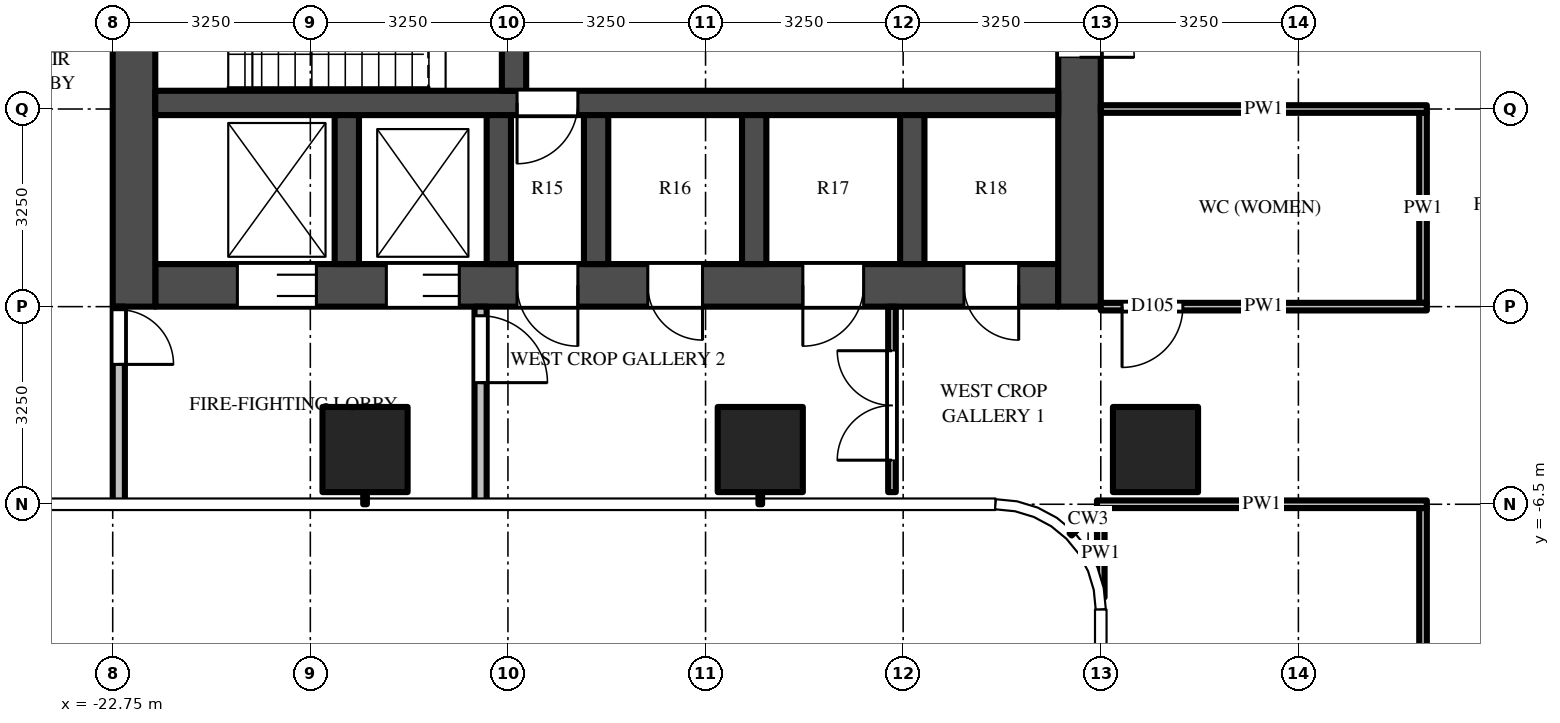
"""IFC4 building model, lengths in metres.
Left out: names, types, materials, properties, quantities, classifications, styles, units other than length and angle.
Written with IfcOpenShell. Run it as: python <this file> out.ifc"""

import sys

from ifc_helpers import new_model, si_unit, direction, frame, frame_2d, origin, origin_2d, place, context, subcontext, project, spatial, rectangle, extrude, source, transform, mapped, element, fill, save


model = new_model("IFC4")
c1 = context("Model", 3, precision=1e-05, world=origin(), true_north=direction((0.0, 1.0)))
c2 = subcontext(c1, "Body", "Model", "MODEL_VIEW")
j1 = project(units=[si_unit("LENGTHUNIT", "METRE"), si_unit("PLANEANGLEUNIT", "RADIAN")], contexts=[c1])
p1 = place(None, origin())
s1 = spatial("IfcSite", under=j1, at=p1, CompositionType="ELEMENT")
p2 = place(p1, origin())
s2 = spatial("IfcBuilding", under=s1, at=p2, CompositionType="ELEMENT")
p3 = place(p2, frame((0.0, 0.0, 70.0)))
s3 = spatial("IfcBuildingStorey", under=s2, at=p3, CompositionType="ELEMENT", Elevation=70.0)
m1 = source(origin(), c2, "Body", "SweptSolid", [
    extrude(rectangle(XDim=1.4, YDim=1.4, at=origin_2d()), origin(), (0.0, 0.0, 1.0), 4.5),
])
for number, where, z_axis, x_axis in (
    (1, (-5.6, -5.6, 0.0), (0.0, 0.0, 1.0), (1.0, 0.0, 0.0)),
    (2, (-12.1, -5.6, 0.0), (0.0, 0.0, 1.0), (1.0, 0.0, 0.0)),
    (3, (-18.6, -5.6, 0.0), (0.0, 0.0, 1.0), (1.0, 0.0, 0.0)),
):
    element("IfcColumn", number, at=place(p3, frame(where, z_axis=z_axis, x_axis=x_axis)), inside=s3, PredefinedType="COLUMN", context=c2, shape_type="MappedRepresentation", body=[
        mapped(m1, transform((0.0, 0.0, 0.0))),
    ])
m2 = source(origin(), c2, "Body", "SweptSolid", [
    extrude(rectangle(XDim=14.85, YDim=0.7, at=frame_2d((7.425, 0.0))), origin(), (0.0, 0.0, 1.0), 4.25),
])
p4 = place(p3, frame((-7.2, -2.9, 0.0), z_axis=(0.0, 0.0, 1.0), x_axis=(-1.0, 0.0, 0.0)))
e4 = element("IfcWall", 4, at=p4, inside=s3, PredefinedType="SHEAR", context=c2, shape_type="MappedRepresentation", body=[
    mapped(m2, transform((0.0, 0.0, 0.0))),
])
m3 = source(origin(), c2, "Body", "SweptSolid", [
    extrude(rectangle(XDim=1.3, YDim=2.1, at=frame_2d((0.65, 1.05))), frame((0.0, 0.36, 0.0), z_axis=(0.0, -1.0, 0.0), x_axis=(1.0, 0.0, 0.0)), (0.0, 0.0, 1.0), 0.72),
])
p5 = place(p4, frame((12.2, 0.0, 0.0)))
e5 = element("IfcOpeningElement", 5, at=p5, cuts=e4, PredefinedType="OPENING", context=c2, shape_type="MappedRepresentation", body=[
    mapped(m3, transform((0.0, 0.0, 0.0))),
])
m4 = source(origin(), c2, "Body", "SweptSolid", [
    extrude(rectangle(XDim=1.2, YDim=2.1, at=frame_2d((0.6, 1.05))), frame((0.0, 0.36, 0.0), z_axis=(0.0, -1.0, 0.0), x_axis=(1.0, 0.0, 0.0)), (0.0, 0.0, 1.0), 0.72),
])
p6 = place(p4, frame((9.85, 0.0, 0.0)))
e6 = element("IfcOpeningElement", 6, at=p6, cuts=e4, PredefinedType="OPENING", context=c2, shape_type="MappedRepresentation", body=[
    mapped(m4, transform((0.0, 0.0, 0.0))),
])
m5 = source(origin(), c2, "Body", "SweptSolid", [
    extrude(rectangle(XDim=1.0, YDim=2.1, at=frame_2d((0.5, 1.05))), frame((0.0, 0.36, 0.0), z_axis=(0.0, -1.0, 0.0), x_axis=(1.0, 0.0, 0.0)), (0.0, 0.0, 1.0), 0.72),
])
p7 = place(p4, frame((7.9, 0.0, 0.0)))
e7 = element("IfcOpeningElement", 7, at=p7, cuts=e4, PredefinedType="OPENING", context=c2, shape_type="MappedRepresentation", body=[
    mapped(m5, transform((0.0, 0.0, 0.0))),
])
m6 = source(origin(), c2, "Body", "SweptSolid", [
    extrude(rectangle(XDim=0.9, YDim=2.1, at=frame_2d((0.45, 1.05))), frame((0.0, 0.36, 0.0), z_axis=(0.0, -1.0, 0.0), x_axis=(1.0, 0.0, 0.0)), (0.0, 0.0, 1.0), 0.72),
])
p8 = place(p4, frame((0.65, 0.0, 0.0)))
e8 = element("IfcOpeningElement", 8, at=p8, cuts=e4, PredefinedType="OPENING", context=c2, shape_type="MappedRepresentation", body=[
    mapped(m6, transform((0.0, 0.0, 0.0))),
])
p9 = place(p4, frame((3.2, 0.0, 0.0)))
e9 = element("IfcOpeningElement", 9, at=p9, cuts=e4, PredefinedType="OPENING", context=c2, shape_type="MappedRepresentation", body=[
    mapped(m5, transform((0.0, 0.0, 0.0))),
])
p10 = place(p4, frame((5.85, 0.0, 0.0)))
e10 = element("IfcOpeningElement", 10, at=p10, cuts=e4, PredefinedType="OPENING", context=c2, shape_type="MappedRepresentation", body=[
    mapped(m6, transform((0.0, 0.0, 0.0))),
])
m7 = source(origin(), c2, "Body", "SweptSolid", [
    extrude(rectangle(XDim=9.05, YDim=0.7, at=frame_2d((4.525, 0.0))), origin(), (0.0, 0.0, 1.0), 4.25),
])
p11 = place(p3, frame((-6.85, 5.8, 0.0), z_axis=(0.0, 0.0, 1.0), x_axis=(0.0, -1.0, 0.0)))
e11 = element("IfcWall", 11, at=p11, inside=s3, PredefinedType="SHEAR", context=c2, shape_type="MappedRepresentation", body=[
    mapped(m7, transform((0.0, 0.0, 0.0))),
])
m8 = source(origin(), c2, "Body", "SweptSolid", [
    extrude(rectangle(XDim=1.8, YDim=2.1, at=frame_2d((0.9, 1.05))), frame((0.0, 0.36, 0.0), z_axis=(0.0, -1.0, 0.0), x_axis=(1.0, 0.0, 0.0)), (0.0, 0.0, 1.0), 0.72),
])
p12 = place(p11, frame((3.15, 0.0, 0.0)))
e12 = element("IfcOpeningElement", 12, at=p12, cuts=e11, PredefinedType="OPENING", context=c2, shape_type="MappedRepresentation", body=[
    mapped(m8, transform((0.0, 0.0, 0.0))),
])
p13 = place(p3, frame((-22.4, 5.8, 0.0), z_axis=(0.0, 0.0, 1.0), x_axis=(0.0, -1.0, 0.0)))
e13 = element("IfcWall", 13, at=p13, inside=s3, PredefinedType="SHEAR", context=c2, shape_type="MappedRepresentation", body=[
    mapped(m7, transform((0.0, 0.0, 0.0))),
])
m9 = source(origin(), c2, "Body", "SweptSolid", [
    extrude(rectangle(XDim=14.85, YDim=0.4, at=frame_2d((7.425, 0.0))), origin(), (0.0, 0.0, 1.0), 4.25),
])
p14 = place(p3, frame((-7.2, 0.1, 0.0), z_axis=(0.0, 0.0, 1.0), x_axis=(-1.0, 0.0, 0.0)))
e14 = element("IfcWall", 14, at=p14, inside=s3, PredefinedType="SHEAR", context=c2, shape_type="MappedRepresentation", body=[
    mapped(m9, transform((0.0, 0.0, 0.0))),
])
m10 = source(origin(), c2, "Body", "SweptSolid", [
    extrude(rectangle(XDim=1.0, YDim=2.1, at=frame_2d((0.5, 1.05))), frame((0.0, 0.21, 0.0), z_axis=(0.0, -1.0, 0.0), x_axis=(1.0, 0.0, 0.0)), (0.0, 0.0, 1.0), 0.42),
])
p15 = place(p14, frame((7.9, 0.0, 0.0)))
e15 = element("IfcOpeningElement", 15, at=p15, cuts=e14, PredefinedType="OPENING", context=c2, shape_type="MappedRepresentation", body=[
    mapped(m10, transform((0.0, 0.0, 0.0))),
])
m11 = source(origin(), c2, "Body", "SweptSolid", [
    extrude(rectangle(XDim=5.5, YDim=0.4, at=frame_2d((2.75, 0.0))), origin(), (0.0, 0.0, 1.0), 4.25),
])
p16 = place(p3, frame((-16.15, 5.8, 0.0), z_axis=(0.0, 0.0, 1.0), x_axis=(0.0, -1.0, 0.0)))
e16 = element("IfcWall", 16, at=p16, inside=s3, PredefinedType="SHEAR", context=c2, shape_type="MappedRepresentation", body=[
    mapped(m11, transform((0.0, 0.0, 0.0))),
])
m12 = source(origin(), c2, "Body", "SweptSolid", [
    extrude(rectangle(XDim=1.1, YDim=2.1, at=frame_2d((0.55, 1.05))), frame((0.0, 0.21, 0.0), z_axis=(0.0, -1.0, 0.0), x_axis=(1.0, 0.0, 0.0)), (0.0, 0.0, 1.0), 0.42),
])
p17 = place(p16, frame((0.725, 0.0, 0.0)))
e17 = element("IfcOpeningElement", 17, at=p17, cuts=e16, PredefinedType="OPENING", context=c2, shape_type="MappedRepresentation", body=[
    mapped(m12, transform((0.0, 0.0, 0.0))),
])
p18 = place(p16, frame((3.675, 0.0, 0.0)))
e18 = element("IfcOpeningElement", 18, at=p18, cuts=e16, PredefinedType="OPENING", context=c2, shape_type="MappedRepresentation", body=[
    mapped(m12, transform((0.0, 0.0, 0.0))),
])
m13 = source(origin(), c2, "Body", "SweptSolid", [
    extrude(rectangle(XDim=2.45, YDim=0.4, at=frame_2d((1.225, 0.0))), origin(), (0.0, 0.0, 1.0), 4.25),
])
for number, where, z_axis, x_axis in (
    (19, (-9.6, -0.1, 0.0), (0.0, 0.0, 1.0), (0.0, -1.0, 0.0)),
    (20, (-12.2, -0.1, 0.0), (0.0, 0.0, 1.0), (0.0, -1.0, 0.0)),
    (21, (-14.8, -0.1, 0.0), (0.0, 0.0, 1.0), (0.0, -1.0, 0.0)),
    (22, (-16.4, -0.1, 0.0), (0.0, 0.0, 1.0), (0.0, -1.0, 0.0)),
    (23, (-18.9, -0.1, 0.0), (0.0, 0.0, 1.0), (0.0, -1.0, 0.0)),
):
    element("IfcWall", number, at=place(p3, frame(where, z_axis=z_axis, x_axis=x_axis)), inside=s3, PredefinedType="SHEAR", context=c2, shape_type="MappedRepresentation", body=[
        mapped(m13, transform((0.0, 0.0, 0.0))),
    ])
m14 = source(origin(), c2, "Body", "SweptSolid", [
    extrude(rectangle(XDim=3.25, YDim=0.2, at=frame_2d((1.625, 0.0))), origin(), (0.0, 0.0, 1.0), 4.25),
])
p19 = place(p3, frame((-16.7, -3.25, 0.0), z_axis=(0.0, 0.0, 1.0), x_axis=(0.0, -1.0, 0.0)))
e24 = element("IfcWall", 24, at=p19, inside=s3, PredefinedType="PARTITIONING", context=c2, shape_type="MappedRepresentation", body=[
    mapped(m14, transform((0.0, 0.0, 0.0))),
])
m15 = source(origin(), c2, "Body", "SweptSolid", [
    extrude(rectangle(XDim=1.1, YDim=2.1, at=frame_2d((0.55, 1.05))), frame((0.0, 0.11, 0.0), z_axis=(0.0, -1.0, 0.0), x_axis=(1.0, 0.0, 0.0)), (0.0, 0.0, 1.0), 0.22),
])
p20 = place(p19, frame((0.15, 0.0, 0.0)))
e25 = element("IfcOpeningElement", 25, at=p20, cuts=e24, PredefinedType="OPENING", context=c2, shape_type="MappedRepresentation", body=[
    mapped(m15, transform((0.0, 0.0, 0.0))),
])
p21 = place(p3, frame((-22.65, -3.25, 0.0), z_axis=(0.0, 0.0, 1.0), x_axis=(0.0, -1.0, 0.0)))
e26 = element("IfcWall", 26, at=p21, inside=s3, PredefinedType="PARTITIONING", context=c2, shape_type="MappedRepresentation", body=[
    mapped(m14, transform((0.0, 0.0, 0.0))),
])
m16 = source(origin(), c2, "Body", "SweptSolid", [
    extrude(rectangle(XDim=0.9, YDim=2.1, at=frame_2d((0.45, 1.05))), frame((0.0, 0.11, 0.0), z_axis=(0.0, -1.0, 0.0), x_axis=(1.0, 0.0, 0.0)), (0.0, 0.0, 1.0), 0.22),
])
p22 = place(p21, frame((0.05, 0.0, 0.0)))
e27 = element("IfcOpeningElement", 27, at=p22, cuts=e26, PredefinedType="OPENING", context=c2, shape_type="MappedRepresentation", body=[
    mapped(m16, transform((0.0, 0.0, 0.0))),
])
m17 = source(origin(), c2, "Body", "SweptSolid", [
    extrude(rectangle(XDim=3.05, YDim=0.125, at=frame_2d((1.525, 0.0))), origin(), (0.0, 0.0, 1.0), 3.33),
])
p23 = place(p3, frame((-9.934, -6.3, 0.0), z_axis=(0.0, 0.0, 1.0), x_axis=(0.0, 1.0, 0.0)))
e28 = element("IfcWall", 28, at=p23, inside=s3, PredefinedType="PARTITIONING", context=c2, shape_type="MappedRepresentation", body=[
    mapped(m17, transform((0.0, 0.0, 0.0))),
])
m18 = source(origin(), c2, "Body", "SweptSolid", [
    extrude(rectangle(XDim=1.8, YDim=2.1, at=frame_2d((0.9, 1.05))), frame((0.0, 0.073, 0.0), z_axis=(0.0, -1.0, 0.0), x_axis=(1.0, 0.0, 0.0)), (0.0, 0.0, 1.0), 0.145),
])
p24 = place(p23, frame((0.525, 0.0, 0.0)))
e29 = element("IfcOpeningElement", 29, at=p24, cuts=e28, PredefinedType="OPENING", context=c2, shape_type="MappedRepresentation", body=[
    mapped(m18, transform((0.0, 0.0, 0.0))),
])
m19 = source(origin(), c2, "Body", "SweptSolid", [
    extrude(rectangle(XDim=1.469, YDim=0.125, at=frame_2d((0.734, 0.0))), origin(), (0.0, 0.0, 1.0), 4.25),
])
p25 = place(p3, frame((-6.5, -6.562, 0.0), z_axis=(0.0, 0.0, 1.0), x_axis=(0.0, -1.0, 0.0)))
e30 = element("IfcWall", 30, at=p25, inside=s3, PredefinedType="PARTITIONING", context=c2, shape_type="MappedRepresentation", body=[
    mapped(m19, transform((0.0, 0.0, 0.0))),
])
m20 = source(origin(), c2, "Body", "SweptSolid", [
    extrude(rectangle(XDim=5.475, YDim=0.125, at=frame_2d((2.738, 0.0))), origin(), (0.0, 0.0, 1.0), 3.468),
])
p26 = place(p3, frame((-1.2, -6.562, 0.0), z_axis=(0.0, 0.0, 1.0), x_axis=(0.0, -1.0, 0.0)))
e31 = element("IfcWall", 31, at=p26, inside=s3, PredefinedType="PARTITIONING", context=c2, shape_type="MappedRepresentation", body=[
    mapped(m20, transform((0.0, 0.0, 0.0))),
])
m21 = source(origin(), c2, "Body", "SweptSolid", [
    extrude(rectangle(XDim=1.2, YDim=2.1, at=frame_2d((0.6, 1.05))), frame((0.0, 0.073, 0.0), z_axis=(0.0, -1.0, 0.0), x_axis=(1.0, 0.0, 0.0)), (0.0, 0.0, 1.0), 0.145),
])
p27 = place(p26, frame((3.988, 0.0, 0.0)))
e32 = element("IfcOpeningElement", 32, at=p27, cuts=e31, PredefinedType="OPENING", context=c2, shape_type="MappedRepresentation", body=[
    mapped(m21, transform((0.0, 0.0, 0.0))),
])
m22 = source(origin(), c2, "Body", "SweptSolid", [
    extrude(rectangle(XDim=3.125, YDim=0.125, at=frame_2d((1.562, 0.0))), origin(), (0.0, 0.0, 1.0), 3.546),
])
p28 = place(p3, frame((-1.2, -0.062, 0.0), z_axis=(0.0, 0.0, 1.0), x_axis=(0.0, -1.0, 0.0)))
e33 = element("IfcWall", 33, at=p28, inside=s3, PredefinedType="PARTITIONING", context=c2, shape_type="MappedRepresentation", body=[
    mapped(m22, transform((0.0, 0.0, 0.0))),
])
m23 = source(origin(), c2, "Body", "SweptSolid", [
    extrude(rectangle(XDim=5.425, YDim=0.125, at=frame_2d((2.712, 0.0))), origin(), (0.0, 0.0, 1.0), 3.33),
])
p29 = place(p3, frame((-1.137, -6.5, 0.0), z_axis=(0.0, 0.0, 1.0), x_axis=(-1.0, 0.0, 0.0)))
e34 = element("IfcWall", 34, at=p29, inside=s3, PredefinedType="PARTITIONING", context=c2, shape_type="MappedRepresentation", body=[
    mapped(m23, transform((0.0, 0.0, 0.0))),
])
m24 = source(origin(), c2, "Body", "SweptSolid", [
    extrude(rectangle(XDim=5.363, YDim=0.125, at=frame_2d((2.681, 0.0))), origin(), (0.0, 0.0, 1.0), 3.468),
])
p30 = place(p3, frame((-1.137, -3.25, 0.0), z_axis=(0.0, 0.0, 1.0), x_axis=(-1.0, 0.0, 0.0)))
e35 = element("IfcWall", 35, at=p30, inside=s3, PredefinedType="PARTITIONING", context=c2, shape_type="MappedRepresentation", body=[
    mapped(m24, transform((0.0, 0.0, 0.0))),
])
m25 = source(origin(), c2, "Body", "SweptSolid", [
    extrude(rectangle(XDim=1.0, YDim=2.1, at=frame_2d((0.5, 1.05))), frame((0.0, 0.073, 0.0), z_axis=(0.0, -1.0, 0.0), x_axis=(1.0, 0.0, 0.0)), (0.0, 0.0, 1.0), 0.145),
])
p31 = place(p30, frame((4.012, 0.0, 0.0)))
e36 = element("IfcOpeningElement", 36, at=p31, cuts=e35, PredefinedType="OPENING", context=c2, shape_type="MappedRepresentation", body=[
    mapped(m25, transform((0.0, 0.0, 0.0))),
])
p32 = place(p3, frame((-1.137, 0.0, 0.0), z_axis=(0.0, 0.0, 1.0), x_axis=(-1.0, 0.0, 0.0)))
e37 = element("IfcWall", 37, at=p32, inside=s3, PredefinedType="PARTITIONING", context=c2, shape_type="MappedRepresentation", body=[
    mapped(m24, transform((0.0, 0.0, 0.0))),
])
m26 = source(origin(), c2, "Body", "SweptSolid", [
    extrude(rectangle(XDim=1.3, YDim=2.1, at=frame_2d((0.65, 1.05))), frame((0.0, -0.275, 0.0), z_axis=(0.0, -1.0, 0.0), x_axis=(1.0, 0.0, 0.0)), (0.0, 0.0, 1.0), 0.05),
])
p33 = place(p5, origin())
e38 = element("IfcDoor", 38, at=p33, inside=s3, OperationType="DOUBLE_DOOR_SLIDING", PredefinedType="DOOR", context=c2, shape_type="MappedRepresentation", body=[
    mapped(m26, transform((0.0, 0.0, 0.0))),
])
fill(e5, e38)
m27 = source(origin(), c2, "Body", "SweptSolid", [
    extrude(rectangle(XDim=1.2, YDim=2.1, at=frame_2d((0.6, 1.05))), frame((0.0, -0.275, 0.0), z_axis=(0.0, -1.0, 0.0), x_axis=(1.0, 0.0, 0.0)), (0.0, 0.0, 1.0), 0.05),
])
p34 = place(p6, origin())
e39 = element("IfcDoor", 39, at=p34, inside=s3, OperationType="DOUBLE_DOOR_SLIDING", PredefinedType="DOOR", context=c2, shape_type="MappedRepresentation", body=[
    mapped(m27, transform((0.0, 0.0, 0.0))),
])
fill(e6, e39)
m28 = source(origin(), c2, "Body", "SweptSolid", [
    extrude(rectangle(XDim=1.8, YDim=2.1, at=frame_2d((0.9, 1.05))), frame((0.0, -0.275, 0.0), z_axis=(0.0, -1.0, 0.0), x_axis=(1.0, 0.0, 0.0)), (0.0, 0.0, 1.0), 0.05),
])
p35 = place(p12, origin())
e40 = element("IfcDoor", 40, at=p35, inside=s3, OperationType="DOUBLE_DOOR_SINGLE_SWING", PredefinedType="DOOR", context=c2, shape_type="MappedRepresentation", body=[
    mapped(m28, transform((0.0, 0.0, 0.0))),
])
fill(e12, e40)
m29 = source(origin(), c2, "Body", "SweptSolid", [
    extrude(rectangle(XDim=1.0, YDim=2.1, at=frame_2d((0.5, 1.05))), frame((0.0, 0.025, 0.0), z_axis=(0.0, -1.0, 0.0), x_axis=(1.0, 0.0, 0.0)), (0.0, 0.0, 1.0), 0.05),
])
p36 = place(p15, origin())
e41 = element("IfcDoor", 41, at=p36, inside=s3, OperationType="SINGLE_SWING_RIGHT", PredefinedType="DOOR", context=c2, shape_type="MappedRepresentation", body=[
    mapped(m29, transform((0.0, 0.0, 0.0))),
])
fill(e15, e41)
m30 = source(origin(), c2, "Body", "SweptSolid", [
    extrude(rectangle(XDim=1.0, YDim=2.1, at=frame_2d((0.5, 1.05))), frame((0.0, -0.275, 0.0), z_axis=(0.0, -1.0, 0.0), x_axis=(1.0, 0.0, 0.0)), (0.0, 0.0, 1.0), 0.05),
])
p37 = place(p7, origin())
e42 = element("IfcDoor", 42, at=p37, inside=s3, OperationType="SINGLE_SWING_LEFT", PredefinedType="DOOR", context=c2, shape_type="MappedRepresentation", body=[
    mapped(m30, transform((0.0, 0.0, 0.0))),
])
fill(e7, e42)
m31 = source(origin(), c2, "Body", "SweptSolid", [
    extrude(rectangle(XDim=1.1, YDim=2.1, at=frame_2d((0.55, 1.05))), frame((0.0, 0.025, 0.0), z_axis=(0.0, -1.0, 0.0), x_axis=(1.0, 0.0, 0.0)), (0.0, 0.0, 1.0), 0.05),
])
p38 = place(p20, origin())
e43 = element("IfcDoor", 43, at=p38, inside=s3, OperationType="SINGLE_SWING_RIGHT", PredefinedType="DOOR", context=c2, shape_type="MappedRepresentation", body=[
    mapped(m31, transform((0.0, 0.0, 0.0))),
])
fill(e25, e43)
m32 = source(origin(), c2, "Body", "SweptSolid", [
    extrude(rectangle(XDim=0.9, YDim=2.1, at=frame_2d((0.45, 1.05))), frame((0.0, 0.025, 0.0), z_axis=(0.0, -1.0, 0.0), x_axis=(1.0, 0.0, 0.0)), (0.0, 0.0, 1.0), 0.05),
])
p39 = place(p22, origin())
e44 = element("IfcDoor", 44, at=p39, inside=s3, OperationType="SINGLE_SWING_RIGHT", PredefinedType="DOOR", context=c2, shape_type="MappedRepresentation", body=[
    mapped(m32, transform((0.0, 0.0, 0.0))),
])
fill(e27, e44)
m33 = source(origin(), c2, "Body", "SweptSolid", [
    extrude(rectangle(XDim=0.9, YDim=2.1, at=frame_2d((0.45, 1.05))), frame((0.0, -0.275, 0.0), z_axis=(0.0, -1.0, 0.0), x_axis=(1.0, 0.0, 0.0)), (0.0, 0.0, 1.0), 0.05),
])
p40 = place(p8, origin())
e45 = element("IfcDoor", 45, at=p40, inside=s3, OperationType="SINGLE_SWING_LEFT", PredefinedType="DOOR", context=c2, shape_type="MappedRepresentation", body=[
    mapped(m33, transform((0.0, 0.0, 0.0))),
])
fill(e8, e45)
p41 = place(p9, origin())
e46 = element("IfcDoor", 46, at=p41, inside=s3, OperationType="SINGLE_SWING_RIGHT", PredefinedType="DOOR", context=c2, shape_type="MappedRepresentation", body=[
    mapped(m30, transform((0.0, 0.0, 0.0))),
])
fill(e9, e46)
p42 = place(p10, origin())
e47 = element("IfcDoor", 47, at=p42, inside=s3, OperationType="SINGLE_SWING_LEFT", PredefinedType="DOOR", context=c2, shape_type="MappedRepresentation", body=[
    mapped(m33, transform((0.0, 0.0, 0.0))),
])
fill(e10, e47)
m34 = source(origin(), c2, "Body", "SweptSolid", [
    extrude(rectangle(XDim=1.8, YDim=2.1, at=frame_2d((0.9, 1.05))), frame((0.0, 0.025, 0.0), z_axis=(0.0, -1.0, 0.0), x_axis=(1.0, 0.0, 0.0)), (0.0, 0.0, 1.0), 0.05),
])
p43 = place(p24, origin())
e48 = element("IfcDoor", 48, at=p43, inside=s3, OperationType="DOUBLE_DOOR_SINGLE_SWING", PredefinedType="DOOR", context=c2, shape_type="MappedRepresentation", body=[
    mapped(m34, transform((0.0, 0.0, 0.0))),
])
fill(e29, e48)
p44 = place(p31, origin())
e49 = element("IfcDoor", 49, at=p44, inside=s3, OperationType="SINGLE_SWING_RIGHT", PredefinedType="DOOR", context=c2, shape_type="MappedRepresentation", body=[
    mapped(m29, transform((0.0, 0.0, 0.0))),
])
fill(e36, e49)
save(model, sys.argv[1])
